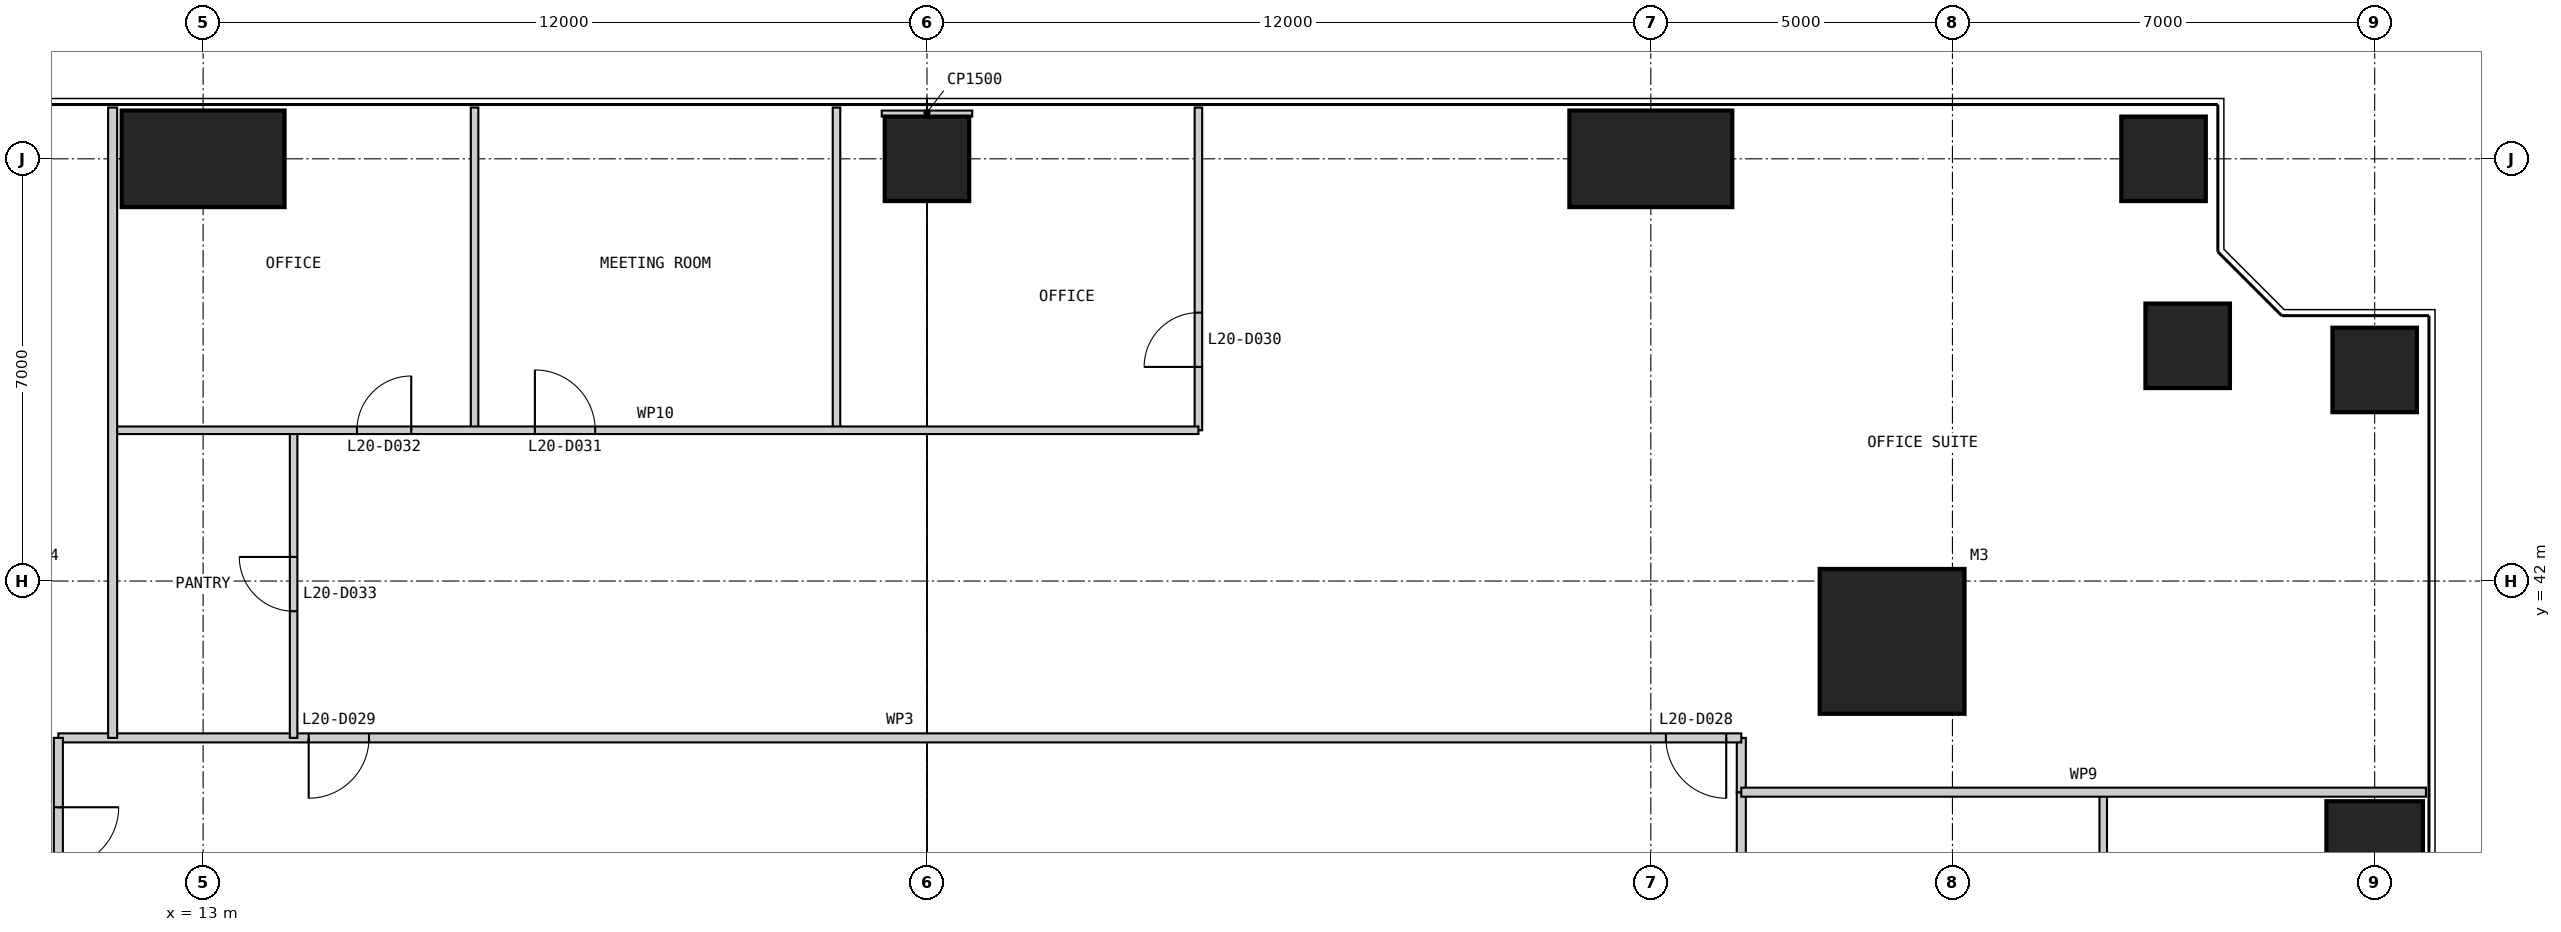
"""IFC4 building model, lengths in metres.
Left out: names, types, materials, properties, quantities, classifications, styles, units other than length and angle.
Written with IfcOpenShell. Run it as: python <this file> out.ifc"""

import sys

from ifc_helpers import new_model, si_unit, direction, frame, frame_2d, origin, origin_2d, place, context, subcontext, project, spatial, rectangle, extrude, element, fill, save


model = new_model("IFC4")
c1 = context("Model", 3, precision=1e-05, world=origin(), true_north=direction((0.0, 1.0)))
c2 = subcontext(c1, "Body", "Model", "MODEL_VIEW")
j1 = project(units=[si_unit("LENGTHUNIT", "METRE"), si_unit("PLANEANGLEUNIT", "RADIAN")], contexts=[c1])
p1 = place(None, origin())
s1 = spatial("IfcSite", under=j1, at=p1, CompositionType="ELEMENT")
p2 = place(p1, origin())
s2 = spatial("IfcBuilding", under=s1, at=p2, CompositionType="ELEMENT")
p3 = place(p2, frame((0.0, 0.0, 87.0)))
s3 = spatial("IfcBuildingStorey", under=s2, at=p3, CompositionType="ELEMENT", Elevation=87.0)
p4 = place(p3, frame((41.0, 41.0, 0.0), z_axis=(0.0, 0.0, 1.0), x_axis=(1.0, 0.0, 0.0)))
e1 = element("IfcColumn", 1, at=p4, inside=s3, PredefinedType="COLUMN", context=c2, shape_type="SweptSolid", body=[
    extrude(rectangle(XDim=2.4, YDim=2.4, at=origin_2d()), origin(), (0.0, 0.0, 1.0), 4.0),
])
p5 = place(p3, frame((49.0, 37.0, 0.0), z_axis=(0.0, 0.0, 1.0), x_axis=(1.0, 0.0, 0.0)))
e2 = element("IfcColumn", 2, at=p5, inside=s3, PredefinedType="COLUMN", context=c2, shape_type="SweptSolid", body=[
    extrude(rectangle(XDim=1.6, YDim=2.7, at=origin_2d()), origin(), (0.0, 0.0, 1.0), 4.0),
])
for number, where, z_axis, x_axis in (
    (3, (49.0, 45.5, 0.0), (0.0, 0.0, 1.0), (1.0, 0.0, 0.0)),
    (4, (45.9, 45.9, 0.0), (0.0, 0.0, 1.0), (1.0, 0.0, 0.0)),
    (5, (45.5, 49.0, 0.0), (0.0, 0.0, 1.0), (1.0, 0.0, 0.0)),
):
    element("IfcColumn", number, at=place(p3, frame(where, z_axis=z_axis, x_axis=x_axis)), inside=s3, PredefinedType="COLUMN", context=c2, shape_type="SweptSolid", body=[
        extrude(rectangle(XDim=1.4, YDim=1.4, at=origin_2d()), origin(), (0.0, 0.0, 1.0), 4.0),
    ])
p6 = place(p3, frame((37.0, 49.0, 0.0), z_axis=(0.0, 0.0, 1.0), x_axis=(1.0, 0.0, 0.0)))
e6 = element("IfcColumn", 6, at=p6, inside=s3, PredefinedType="COLUMN", context=c2, shape_type="SweptSolid", body=[
    extrude(rectangle(XDim=2.7, YDim=1.6, at=origin_2d()), origin(), (0.0, 0.0, 1.0), 4.0),
])
p7 = place(p3, frame((25.0, 49.0, 0.0), z_axis=(0.0, 0.0, 1.0), x_axis=(1.0, 0.0, 0.0)))
e7 = element("IfcColumn", 7, at=p7, inside=s3, PredefinedType="COLUMN", context=c2, shape_type="SweptSolid", body=[
    extrude(rectangle(XDim=1.4, YDim=1.4, at=origin_2d()), origin(), (0.0, 0.0, 1.0), 4.0),
])
p8 = place(p3, frame((13.0, 49.0, 0.0), z_axis=(0.0, 0.0, 1.0), x_axis=(1.0, 0.0, 0.0)))
e8 = element("IfcColumn", 8, at=p8, inside=s3, PredefinedType="COLUMN", context=c2, shape_type="SweptSolid", body=[
    extrude(rectangle(XDim=2.7, YDim=1.6, at=origin_2d()), origin(), (0.0, 0.0, 1.0), 4.0),
])
p9 = place(p3, frame((38.5, 11.5, 0.0), z_axis=(0.0, 0.0, 1.0), x_axis=(0.0, 1.0, 0.0)))
e9 = element("IfcWall", 9, at=p9, inside=s3, PredefinedType="PARTITIONING", context=c2, shape_type="SweptSolid", body=[
    extrude(rectangle(XDim=27.0, YDim=0.15, at=frame_2d((13.5, 0.0))), origin(), (0.0, 0.0, 1.0), 3.8),
])
p10 = place(p9, frame((2.5, 0.0, 0.0)))
e10 = element("IfcOpeningElement", 10, at=p10, cuts=e9, PredefinedType="OPENING", context=c2, shape_type="SweptSolid", body=[
    extrude(rectangle(XDim=1.0, YDim=2.2, at=frame_2d((0.5, 1.1))), frame((0.0, 0.085, 0.0), z_axis=(0.0, -1.0, 0.0), x_axis=(1.0, 0.0, 0.0)), (0.0, 0.0, 1.0), 0.17),
])
p11 = place(p9, frame((16.0, 0.0, 0.0)))
e11 = element("IfcOpeningElement", 11, at=p11, cuts=e9, PredefinedType="OPENING", context=c2, shape_type="SweptSolid", body=[
    extrude(rectangle(XDim=1.0, YDim=2.2, at=frame_2d((0.5, 1.1))), frame((0.0, 0.085, 0.0), z_axis=(0.0, -1.0, 0.0), x_axis=(1.0, 0.0, 0.0)), (0.0, 0.0, 1.0), 0.17),
])
p12 = place(p3, frame((44.5, 32.5, 0.0), z_axis=(0.0, 0.0, 1.0), x_axis=(0.0, 1.0, 0.0)))
e12 = element("IfcWall", 12, at=p12, inside=s3, PredefinedType="PARTITIONING", context=c2, shape_type="SweptSolid", body=[
    extrude(rectangle(XDim=6.0, YDim=0.125, at=frame_2d((3.0, 0.0))), origin(), (0.0, 0.0, 1.0), 3.8),
])
p13 = place(p3, frame((38.5, 38.5, 0.0), z_axis=(0.0, 0.0, 1.0), x_axis=(0.0, 1.0, 0.0)))
e13 = element("IfcWall", 13, at=p13, inside=s3, PredefinedType="PARTITIONING", context=c2, shape_type="SweptSolid", body=[
    extrude(rectangle(XDim=0.9, YDim=0.15, at=frame_2d((0.45, 0.0))), origin(), (0.0, 0.0, 1.0), 3.8),
])
p14 = place(p3, frame((38.5, 39.4, 0.0), z_axis=(0.0, 0.0, 1.0), x_axis=(-1.0, 0.0, 0.0)))
e14 = element("IfcWall", 14, at=p14, inside=s3, PredefinedType="PARTITIONING", context=c2, shape_type="SweptSolid", body=[
    extrude(rectangle(XDim=27.9, YDim=0.15, at=frame_2d((13.95, 0.0))), origin(), (0.0, 0.0, 1.0), 3.8),
])
p15 = place(p14, frame((0.25, 0.0, 0.0)))
e15 = element("IfcOpeningElement", 15, at=p15, cuts=e14, PredefinedType="OPENING", context=c2, shape_type="SweptSolid", body=[
    extrude(rectangle(XDim=1.0, YDim=2.2, at=frame_2d((0.5, 1.1))), frame((0.0, 0.085, 0.0), z_axis=(0.0, -1.0, 0.0), x_axis=(1.0, 0.0, 0.0)), (0.0, 0.0, 1.0), 0.17),
])
p16 = place(p14, frame((22.75, 0.0, 0.0)))
e16 = element("IfcOpeningElement", 16, at=p16, cuts=e14, PredefinedType="OPENING", context=c2, shape_type="SweptSolid", body=[
    extrude(rectangle(XDim=1.0, YDim=2.2, at=frame_2d((0.5, 1.1))), frame((0.0, 0.085, 0.0), z_axis=(0.0, -1.0, 0.0), x_axis=(1.0, 0.0, 0.0)), (0.0, 0.0, 1.0), 0.17),
])
p17 = place(p3, frame((49.85, 38.5, 0.0), z_axis=(0.0, 0.0, 1.0), x_axis=(-1.0, 0.0, 0.0)))
e17 = element("IfcWall", 17, at=p17, inside=s3, PredefinedType="PARTITIONING", context=c2, shape_type="SweptSolid", body=[
    extrude(rectangle(XDim=11.35, YDim=0.15, at=frame_2d((5.675, 0.0))), origin(), (0.0, 0.0, 1.0), 3.8),
])
p18 = place(p3, frame((29.5, 49.85, 0.0), z_axis=(0.0, 0.0, 1.0), x_axis=(0.0, -1.0, 0.0)))
e18 = element("IfcWall", 18, at=p18, inside=s3, PredefinedType="PARTITIONING", context=c2, shape_type="SweptSolid", body=[
    extrude(rectangle(XDim=5.35, YDim=0.125, at=frame_2d((2.675, 0.0))), origin(), (0.0, 0.0, 1.0), 3.8),
])
p19 = place(p18, frame((3.4, 0.0, 0.0)))
e19 = element("IfcOpeningElement", 19, at=p19, cuts=e18, PredefinedType="OPENING", context=c2, shape_type="SweptSolid", body=[
    extrude(rectangle(XDim=0.9, YDim=2.2, at=frame_2d((0.45, 1.1))), frame((0.0, 0.073, 0.0), z_axis=(0.0, -1.0, 0.0), x_axis=(1.0, 0.0, 0.0)), (0.0, 0.0, 1.0), 0.145),
])
for number, where, z_axis, x_axis in (
    (20, (23.5, 49.85, 0.0), (0.0, 0.0, 1.0), (0.0, -1.0, 0.0)),
    (21, (17.5, 49.85, 0.0), (0.0, 0.0, 1.0), (0.0, -1.0, 0.0)),
):
    element("IfcWall", number, at=place(p3, frame(where, z_axis=z_axis, x_axis=x_axis)), inside=s3, PredefinedType="PARTITIONING", context=c2, shape_type="SweptSolid", body=[
        extrude(rectangle(XDim=5.35, YDim=0.125, at=frame_2d((2.675, 0.0))), origin(), (0.0, 0.0, 1.0), 3.8),
    ])
p20 = place(p3, frame((14.5, 44.5, 0.0), z_axis=(0.0, 0.0, 1.0), x_axis=(0.0, -1.0, 0.0)))
e22 = element("IfcWall", 22, at=p20, inside=s3, PredefinedType="PARTITIONING", context=c2, shape_type="SweptSolid", body=[
    extrude(rectangle(XDim=5.1, YDim=0.125, at=frame_2d((2.55, 0.0))), origin(), (0.0, 0.0, 1.0), 3.8),
])
p21 = place(p20, frame((2.1, 0.0, 0.0)))
e23 = element("IfcOpeningElement", 23, at=p21, cuts=e22, PredefinedType="OPENING", context=c2, shape_type="SweptSolid", body=[
    extrude(rectangle(XDim=0.9, YDim=2.2, at=frame_2d((0.45, 1.1))), frame((0.0, 0.073, 0.0), z_axis=(0.0, -1.0, 0.0), x_axis=(1.0, 0.0, 0.0)), (0.0, 0.0, 1.0), 0.145),
])
p22 = place(p3, frame((29.5, 44.5, 0.0), z_axis=(0.0, 0.0, 1.0), x_axis=(-1.0, 0.0, 0.0)))
e24 = element("IfcWall", 24, at=p22, inside=s3, PredefinedType="PARTITIONING", context=c2, shape_type="SweptSolid", body=[
    extrude(rectangle(XDim=18.0, YDim=0.125, at=frame_2d((9.0, 0.0))), origin(), (0.0, 0.0, 1.0), 3.8),
])
p23 = place(p22, frame((10.0, 0.0, 0.0)))
e25 = element("IfcOpeningElement", 25, at=p23, cuts=e24, PredefinedType="OPENING", context=c2, shape_type="SweptSolid", body=[
    extrude(rectangle(XDim=1.0, YDim=2.2, at=frame_2d((0.5, 1.1))), frame((0.0, 0.073, 0.0), z_axis=(0.0, -1.0, 0.0), x_axis=(1.0, 0.0, 0.0)), (0.0, 0.0, 1.0), 0.145),
])
p24 = place(p22, frame((13.05, 0.0, 0.0)))
e26 = element("IfcOpeningElement", 26, at=p24, cuts=e24, PredefinedType="OPENING", context=c2, shape_type="SweptSolid", body=[
    extrude(rectangle(XDim=0.9, YDim=2.2, at=frame_2d((0.45, 1.1))), frame((0.0, 0.073, 0.0), z_axis=(0.0, -1.0, 0.0), x_axis=(1.0, 0.0, 0.0)), (0.0, 0.0, 1.0), 0.145),
])
p25 = place(p3, frame((10.6, 39.4, 0.0), z_axis=(0.0, 0.0, 1.0), x_axis=(0.0, -1.0, 0.0)))
e27 = element("IfcWall", 27, at=p25, inside=s3, PredefinedType="PARTITIONING", context=c2, shape_type="SweptSolid", body=[
    extrude(rectangle(XDim=28.8, YDim=0.15, at=frame_2d((14.4, 0.0))), origin(), (0.0, 0.0, 1.0), 3.8),
])
p26 = place(p25, frame((1.15, 0.0, 0.0)))
e28 = element("IfcOpeningElement", 28, at=p26, cuts=e27, PredefinedType="OPENING", context=c2, shape_type="SweptSolid", body=[
    extrude(rectangle(XDim=1.0, YDim=2.2, at=frame_2d((0.5, 1.1))), frame((0.0, 0.085, 0.0), z_axis=(0.0, -1.0, 0.0), x_axis=(1.0, 0.0, 0.0)), (0.0, 0.0, 1.0), 0.17),
])
p27 = place(p25, frame((23.65, 0.0, 0.0)))
e29 = element("IfcOpeningElement", 29, at=p27, cuts=e27, PredefinedType="OPENING", context=c2, shape_type="SweptSolid", body=[
    extrude(rectangle(XDim=1.0, YDim=2.2, at=frame_2d((0.5, 1.1))), frame((0.0, 0.085, 0.0), z_axis=(0.0, -1.0, 0.0), x_axis=(1.0, 0.0, 0.0)), (0.0, 0.0, 1.0), 0.17),
])
p28 = place(p3, frame((11.5, 49.85, 0.0), z_axis=(0.0, 0.0, 1.0), x_axis=(0.0, -1.0, 0.0)))
e30 = element("IfcWall", 30, at=p28, inside=s3, PredefinedType="PARTITIONING", context=c2, shape_type="SweptSolid", body=[
    extrude(rectangle(XDim=10.45, YDim=0.15, at=frame_2d((5.225, 0.0))), origin(), (0.0, 0.0, 1.0), 3.8),
])
p29 = place(p3, frame((25.0, 49.8, 0.0), z_axis=(0.0, 0.0, 1.0), x_axis=(0.0, -1.0, 0.0)))
e31 = element("IfcWall", 31, at=p29, inside=s3, PredefinedType="PARTITIONING", context=c2, shape_type="SweptSolid", body=[
    extrude(rectangle(XDim=0.1, YDim=1.5, at=frame_2d((0.05, 0.0))), origin(), (0.0, 0.0, 1.0), 3.8),
])
p30 = place(p15, origin())
e32 = element("IfcDoor", 32, at=p30, inside=s3, OperationType="SINGLE_SWING_LEFT", PredefinedType="DOOR", context=c2, shape_type="SweptSolid", body=[
    extrude(rectangle(XDim=1.0, YDim=2.2, at=frame_2d((0.5, 1.1))), frame((0.0, 0.025, 0.0), z_axis=(0.0, -1.0, 0.0), x_axis=(1.0, 0.0, 0.0)), (0.0, 0.0, 1.0), 0.05),
])
fill(e15, e32)
p31 = place(p16, origin())
e33 = element("IfcDoor", 33, at=p31, inside=s3, OperationType="SINGLE_SWING_RIGHT", PredefinedType="DOOR", context=c2, shape_type="SweptSolid", body=[
    extrude(rectangle(XDim=1.0, YDim=2.2, at=frame_2d((0.5, 1.1))), frame((0.0, 0.025, 0.0), z_axis=(0.0, -1.0, 0.0), x_axis=(1.0, 0.0, 0.0)), (0.0, 0.0, 1.0), 0.05),
])
fill(e16, e33)
p32 = place(p19, frame((0.9, 0.0, 0.0), z_axis=(0.0, 0.0, 1.0), x_axis=(-1.0, 0.0, 0.0)))
e34 = element("IfcDoor", 34, at=p32, inside=s3, OperationType="SINGLE_SWING_LEFT", PredefinedType="DOOR", context=c2, shape_type="SweptSolid", body=[
    extrude(rectangle(XDim=0.9, YDim=2.2, at=frame_2d((0.45, 1.1))), frame((0.0, 0.025, 0.0), z_axis=(0.0, -1.0, 0.0), x_axis=(1.0, 0.0, 0.0)), (0.0, 0.0, 1.0), 0.05),
])
fill(e19, e34)
p33 = place(p23, frame((1.0, 0.0, 0.0), z_axis=(0.0, 0.0, 1.0), x_axis=(-1.0, 0.0, 0.0)))
e35 = element("IfcDoor", 35, at=p33, inside=s3, OperationType="SINGLE_SWING_LEFT", PredefinedType="DOOR", context=c2, shape_type="SweptSolid", body=[
    extrude(rectangle(XDim=1.0, YDim=2.2, at=frame_2d((0.5, 1.1))), frame((0.0, 0.025, 0.0), z_axis=(0.0, -1.0, 0.0), x_axis=(1.0, 0.0, 0.0)), (0.0, 0.0, 1.0), 0.05),
])
fill(e25, e35)
p34 = place(p24, frame((0.9, 0.0, 0.0), z_axis=(0.0, 0.0, 1.0), x_axis=(-1.0, 0.0, 0.0)))
e36 = element("IfcDoor", 36, at=p34, inside=s3, OperationType="SINGLE_SWING_RIGHT", PredefinedType="DOOR", context=c2, shape_type="SweptSolid", body=[
    extrude(rectangle(XDim=0.9, YDim=2.2, at=frame_2d((0.45, 1.1))), frame((0.0, 0.025, 0.0), z_axis=(0.0, -1.0, 0.0), x_axis=(1.0, 0.0, 0.0)), (0.0, 0.0, 1.0), 0.05),
])
fill(e26, e36)
p35 = place(p21, frame((0.9, 0.0, 0.0), z_axis=(0.0, 0.0, 1.0), x_axis=(-1.0, 0.0, 0.0)))
e37 = element("IfcDoor", 37, at=p35, inside=s3, OperationType="SINGLE_SWING_RIGHT", PredefinedType="DOOR", context=c2, shape_type="SweptSolid", body=[
    extrude(rectangle(XDim=0.9, YDim=2.2, at=frame_2d((0.45, 1.1))), frame((0.0, 0.025, 0.0), z_axis=(0.0, -1.0, 0.0), x_axis=(1.0, 0.0, 0.0)), (0.0, 0.0, 1.0), 0.05),
])
fill(e23, e37)
p36 = place(p26, origin())
e38 = element("IfcDoor", 38, at=p36, inside=s3, OperationType="SINGLE_SWING_LEFT", PredefinedType="DOOR", context=c2, shape_type="SweptSolid", body=[
    extrude(rectangle(XDim=1.0, YDim=2.2, at=frame_2d((0.5, 1.1))), frame((0.0, 0.025, 0.0), z_axis=(0.0, -1.0, 0.0), x_axis=(1.0, 0.0, 0.0)), (0.0, 0.0, 1.0), 0.05),
])
fill(e28, e38)
save(model, sys.argv[1])
